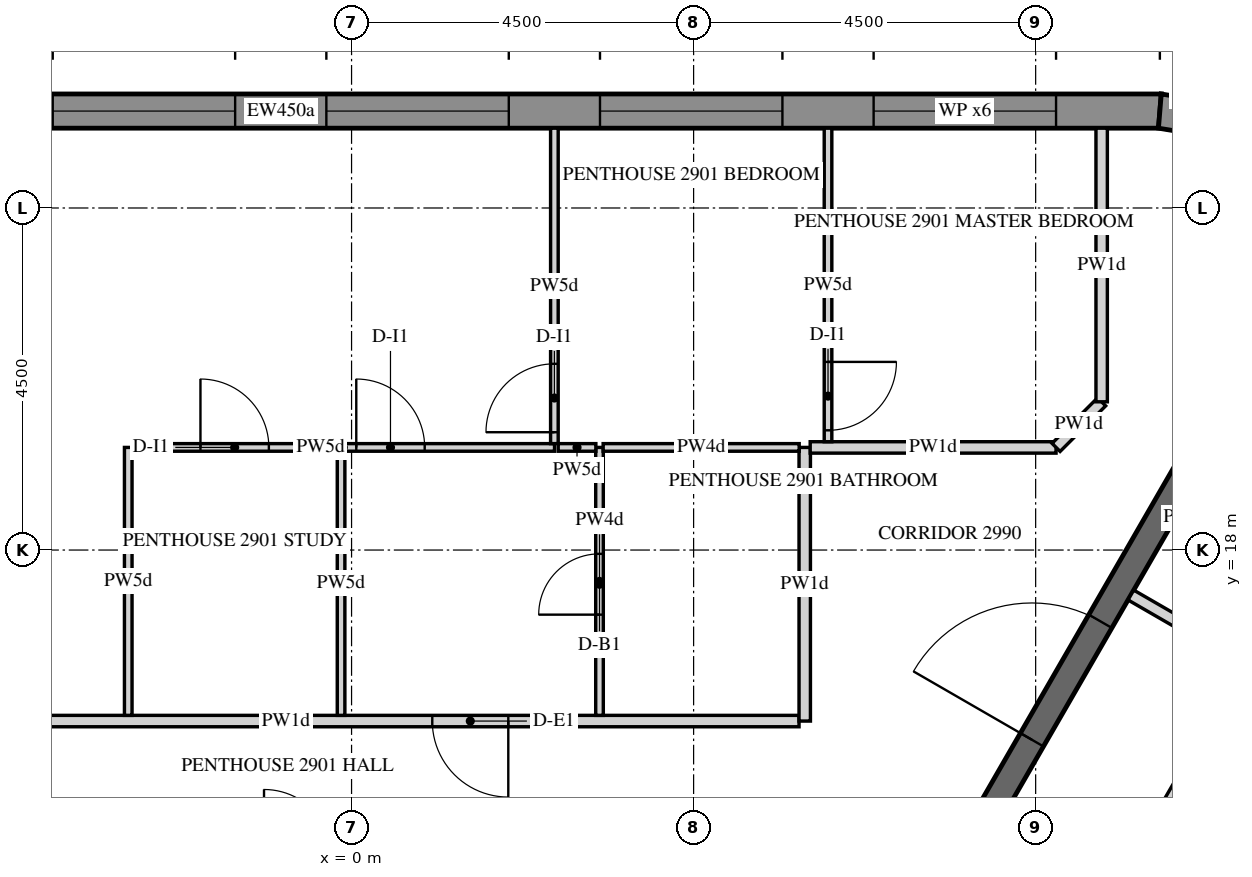
"""IFC4 building model, lengths in metres.
Left out: names, types, materials, properties, quantities, classifications, styles, units other than length and angle.
Written with IfcOpenShell. Run it as: python <this file> out.ifc"""

import sys

from ifc_helpers import new_model, si_unit, direction, frame, frame_2d, origin, place, context, subcontext, project, spatial, polyline, rectangle, outline, extrude, element, fill, save


model = new_model("IFC4")
c1 = context("Model", 3, precision=1e-05, world=origin(), true_north=direction((0.0, 1.0)))
c2 = subcontext(c1, "Body", "Model", "MODEL_VIEW")
j1 = project(units=[si_unit("LENGTHUNIT", "METRE"), si_unit("PLANEANGLEUNIT", "RADIAN")], contexts=[c1])
p1 = place(None, origin())
s1 = spatial("IfcSite", under=j1, at=p1, CompositionType="ELEMENT")
p2 = place(p1, origin())
s2 = spatial("IfcBuilding", under=s1, at=p2, CompositionType="ELEMENT")
p3 = place(p2, frame((0.0, 0.0, 372.9)))
s3 = spatial("IfcBuildingStorey", under=s2, at=p3, CompositionType="ELEMENT", Elevation=372.9)
p4 = place(p3, frame((10.634, 23.775, -0.15), z_axis=(0.0, 0.0, 1.0), x_axis=(-1.0, 0.0, 0.0)))
e1 = element("IfcWall", 1, at=p4, inside=s3, PredefinedType="SOLIDWALL", context=c2, shape_type="SweptSolid", body=[
    extrude(outline(polyline([(-0.018, -0.225), (23.153, -0.225), (23.111, 0.225), (0.018, 0.225), (-0.018, -0.225)])), origin(), (0.0, 0.0, 1.0), 3.55),
])
p5 = place(p4, frame((1.366, 0.0, 0.45)))
e2 = element("IfcOpeningElement", 2, at=p5, cuts=e1, PredefinedType="OPENING", context=c2, shape_type="SweptSolid", body=[
    extrude(rectangle(XDim=2.4, YDim=3.0, at=frame_2d((1.2, 1.5))), frame((0.0, 0.235, 0.0), z_axis=(0.0, -1.0, 0.0), x_axis=(1.0, 0.0, 0.0)), (0.0, 0.0, 1.0), 0.47),
])
p6 = place(p4, frame((4.966, 0.0, 0.45)))
e3 = element("IfcOpeningElement", 3, at=p6, cuts=e1, PredefinedType="OPENING", context=c2, shape_type="SweptSolid", body=[
    extrude(rectangle(XDim=2.4, YDim=3.0, at=frame_2d((1.2, 1.5))), frame((0.0, 0.235, 0.0), z_axis=(0.0, -1.0, 0.0), x_axis=(1.0, 0.0, 0.0)), (0.0, 0.0, 1.0), 0.47),
])
p7 = place(p4, frame((8.566, 0.0, 0.45)))
e4 = element("IfcOpeningElement", 4, at=p7, cuts=e1, PredefinedType="OPENING", context=c2, shape_type="SweptSolid", body=[
    extrude(rectangle(XDim=2.4, YDim=3.0, at=frame_2d((1.2, 1.5))), frame((0.0, 0.235, 0.0), z_axis=(0.0, -1.0, 0.0), x_axis=(1.0, 0.0, 0.0)), (0.0, 0.0, 1.0), 0.47),
])
p8 = place(p4, frame((12.166, 0.0, 0.45)))
e5 = element("IfcOpeningElement", 5, at=p8, cuts=e1, PredefinedType="OPENING", context=c2, shape_type="SweptSolid", body=[
    extrude(rectangle(XDim=2.4, YDim=3.0, at=frame_2d((1.2, 1.5))), frame((0.0, 0.235, 0.0), z_axis=(0.0, -1.0, 0.0), x_axis=(1.0, 0.0, 0.0)), (0.0, 0.0, 1.0), 0.47),
])
p9 = place(p4, frame((15.766, 0.0, 0.45)))
e6 = element("IfcOpeningElement", 6, at=p9, cuts=e1, PredefinedType="OPENING", context=c2, shape_type="SweptSolid", body=[
    extrude(rectangle(XDim=2.4, YDim=3.0, at=frame_2d((1.2, 1.5))), frame((0.0, 0.235, 0.0), z_axis=(0.0, -1.0, 0.0), x_axis=(1.0, 0.0, 0.0)), (0.0, 0.0, 1.0), 0.47),
])
p10 = place(p4, frame((19.366, 0.0, 0.45)))
e7 = element("IfcOpeningElement", 7, at=p10, cuts=e1, PredefinedType="OPENING", context=c2, shape_type="SweptSolid", body=[
    extrude(rectangle(XDim=2.4, YDim=3.0, at=frame_2d((1.2, 1.5))), frame((0.0, 0.235, 0.0), z_axis=(0.0, -1.0, 0.0), x_axis=(1.0, 0.0, 0.0)), (0.0, 0.0, 1.0), 0.47),
])
p11 = place(p3, frame((11.843, 23.576, -0.15), z_axis=(0.0, 0.0, 1.0), x_axis=(-0.986773862881, 0.162102879475, 0.0)))
e8 = element("IfcWall", 8, at=p11, inside=s3, PredefinedType="SOLIDWALL", context=c2, shape_type="SweptSolid", body=[
    extrude(outline(polyline([(-0.037, -0.225), (1.243, -0.225), (1.206, 0.225), (0.037, 0.225), (-0.037, -0.225)])), origin(), (0.0, 0.0, 1.0), 3.55),
])
p12 = place(p3, frame((5.773, 10.0, -0.15), z_axis=(0.0, 0.0, 1.0), x_axis=(0.500007911273, 0.866020836161, 0.0)))
e9 = element("IfcWall", 9, at=p12, inside=s3, PredefinedType="SHEAR", context=c2, shape_type="SweptSolid", body=[
    extrude(rectangle(XDim=14.51, YDim=0.35, at=frame_2d((7.255, 0.0))), origin(), (0.0, 0.0, 1.0), 3.55),
])
p13 = place(p12, frame((6.355, 0.0, 0.15)))
e10 = element("IfcOpeningElement", 10, at=p13, cuts=e9, PredefinedType="OPENING", context=c2, shape_type="SweptSolid", body=[
    extrude(rectangle(XDim=1.8, YDim=2.4, at=frame_2d((0.9, 1.2))), frame((0.0, 0.185, 0.0), z_axis=(0.0, -1.0, 0.0), x_axis=(1.0, 0.0, 0.0)), (0.0, 0.0, 1.0), 0.37),
])
p14 = place(p3, frame((5.887, 15.75, 0.0), z_axis=(0.0, 0.0, 1.0), x_axis=(-1.0, 0.0, 0.0)))
e11 = element("IfcWall", 11, at=p14, inside=s3, PredefinedType="PARTITIONING", context=c2, shape_type="SweptSolid", body=[
    extrude(rectangle(XDim=13.503, YDim=0.15, at=frame_2d((6.752, 0.0))), origin(), (0.0, 0.0, 1.0), 2.47),
])
p15 = place(p14, frame((3.825, 0.0, 0.0)))
e12 = element("IfcOpeningElement", 12, at=p15, cuts=e11, PredefinedType="OPENING", context=c2, shape_type="SweptSolid", body=[
    extrude(rectangle(XDim=1.0, YDim=2.1, at=frame_2d((0.5, 1.05))), frame((0.0, 0.085, 0.0), z_axis=(0.0, -1.0, 0.0), x_axis=(1.0, 0.0, 0.0)), (0.0, 0.0, 1.0), 0.17),
])
p16 = place(p3, frame((5.962, 19.35, 0.0), z_axis=(0.0, 0.0, 1.0), x_axis=(0.0, -1.0, 0.0)))
e13 = element("IfcWall", 13, at=p16, inside=s3, PredefinedType="PARTITIONING", context=c2, shape_type="SweptSolid", body=[
    extrude(rectangle(XDim=3.6, YDim=0.15, at=frame_2d((1.8, 0.0))), origin(), (0.0, 0.0, 1.0), 2.47),
])
p17 = place(p3, frame((9.268, 19.35, 0.0), z_axis=(0.0, 0.0, 1.0), x_axis=(-1.0, 0.0, 0.0)))
e14 = element("IfcWall", 14, at=p17, inside=s3, PredefinedType="PARTITIONING", context=c2, shape_type="SweptSolid", body=[
    extrude(rectangle(XDim=3.234, YDim=0.15, at=frame_2d((1.617, 0.0))), origin(), (0.0, 0.0, 1.0), 2.47),
])
p18 = place(p3, frame((9.868, 19.95, 0.0), z_axis=(0.0, 0.0, 1.0), x_axis=(-0.707250750801, -0.706962782254, 0.0)))
e15 = element("IfcWall", 15, at=p18, inside=s3, PredefinedType="PARTITIONING", context=c2, shape_type="SweptSolid", body=[
    extrude(rectangle(XDim=0.848, YDim=0.15, at=frame_2d((0.424, 0.0))), origin(), (0.0, 0.0, 1.0), 2.47),
])
p19 = place(p3, frame((9.868, 23.55, 0.0), z_axis=(0.0, 0.0, 1.0), x_axis=(0.0, -1.0, 0.0)))
e16 = element("IfcWall", 16, at=p19, inside=s3, PredefinedType="PARTITIONING", context=c2, shape_type="SweptSolid", body=[
    extrude(rectangle(XDim=3.6, YDim=0.15, at=frame_2d((1.8, 0.0))), origin(), (0.0, 0.0, 1.0), 2.47),
])
p20 = place(p3, frame((8.92, 11.499, 0.0), z_axis=(0.0, 0.0, 1.0), x_axis=(0.499984314267, 0.866034459757, 0.0)))
e17 = element("IfcWall", 17, at=p20, inside=s3, PredefinedType="PARTITIONING", context=c2, shape_type="SweptSolid", body=[
    extrude(rectangle(XDim=5.784, YDim=0.15, at=frame_2d((2.892, 0.0))), origin(), (0.0, 0.0, 1.0), 2.47),
])
p21 = place(p3, frame((11.747, 16.546, 0.0), z_axis=(0.0, 0.0, 1.0), x_axis=(-0.866013532718, 0.500020560727, 0.0)))
e18 = element("IfcWall", 18, at=p21, inside=s3, PredefinedType="PARTITIONING", context=c2, shape_type="SweptSolid", body=[
    extrude(rectangle(XDim=1.725, YDim=0.15, at=frame_2d((0.863, 0.0))), origin(), (0.0, 0.0, 1.0), 2.47),
])
p22 = place(p3, frame((-2.888, 19.35, 0.0), z_axis=(0.0, 0.0, 1.0), x_axis=(1.0, 0.0, 0.0)))
e19 = element("IfcWall", 19, at=p22, inside=s3, PredefinedType="PARTITIONING", context=c2, shape_type="SweptSolid", body=[
    extrude(rectangle(XDim=5.558, YDim=0.1, at=frame_2d((2.779, 0.0))), origin(), (0.0, 0.0, 1.0), 2.47),
])
p23 = place(p22, frame((2.95, 0.0, 0.0)))
e20 = element("IfcOpeningElement", 20, at=p23, cuts=e19, PredefinedType="OPENING", context=c2, shape_type="SweptSolid", body=[
    extrude(rectangle(XDim=0.9, YDim=2.1, at=frame_2d((0.45, 1.05))), frame((0.0, 0.06, 0.0), z_axis=(0.0, -1.0, 0.0), x_axis=(1.0, 0.0, 0.0)), (0.0, 0.0, 1.0), 0.12),
])
p24 = place(p22, frame((0.9, 0.0, 0.0)))
e21 = element("IfcOpeningElement", 21, at=p24, cuts=e19, PredefinedType="OPENING", context=c2, shape_type="SweptSolid", body=[
    extrude(rectangle(XDim=0.9, YDim=2.1, at=frame_2d((0.45, 1.05))), frame((0.0, 0.06, 0.0), z_axis=(0.0, -1.0, 0.0), x_axis=(1.0, 0.0, 0.0)), (0.0, 0.0, 1.0), 0.12),
])
p25 = place(p3, frame((2.668, 19.4, 0.0), z_axis=(0.0, 0.0, 1.0), x_axis=(0.0, 1.0, 0.0)))
e22 = element("IfcWall", 22, at=p25, inside=s3, PredefinedType="PARTITIONING", context=c2, shape_type="SweptSolid", body=[
    extrude(rectangle(XDim=4.15, YDim=0.1, at=frame_2d((2.075, 0.0))), origin(), (0.0, 0.0, 1.0), 2.47),
])
p26 = place(p25, frame((0.15, 0.0, 0.0)))
e23 = element("IfcOpeningElement", 23, at=p26, cuts=e22, PredefinedType="OPENING", context=c2, shape_type="SweptSolid", body=[
    extrude(rectangle(XDim=0.9, YDim=2.1, at=frame_2d((0.45, 1.05))), frame((0.0, 0.06, 0.0), z_axis=(0.0, -1.0, 0.0), x_axis=(1.0, 0.0, 0.0)), (0.0, 0.0, 1.0), 0.12),
])
p27 = place(p3, frame((-2.938, 15.825, 0.0), z_axis=(0.0, 0.0, 1.0), x_axis=(0.0, 1.0, 0.0)))
e24 = element("IfcWall", 24, at=p27, inside=s3, PredefinedType="PARTITIONING", context=c2, shape_type="SweptSolid", body=[
    extrude(rectangle(XDim=3.525, YDim=0.1, at=frame_2d((1.763, 0.0))), origin(), (0.0, 0.0, 1.0), 2.47),
])
p28 = place(p3, frame((3.262, 15.825, 0.0), z_axis=(0.0, 0.0, 1.0), x_axis=(0.0, 1.0, 0.0)))
e25 = element("IfcWall", 25, at=p28, inside=s3, PredefinedType="PARTITIONING", context=c2, shape_type="SweptSolid", body=[
    extrude(rectangle(XDim=3.525, YDim=0.1, at=frame_2d((1.763, 0.0))), origin(), (0.0, 0.0, 1.0), 2.47),
])
p29 = place(p28, frame((1.325, 0.0, 0.0)))
e26 = element("IfcOpeningElement", 26, at=p29, cuts=e25, PredefinedType="OPENING", context=c2, shape_type="SweptSolid", body=[
    extrude(rectangle(XDim=0.8, YDim=2.1, at=frame_2d((0.4, 1.05))), frame((0.0, 0.06, 0.0), z_axis=(0.0, -1.0, 0.0), x_axis=(1.0, 0.0, 0.0)), (0.0, 0.0, 1.0), 0.12),
])
p30 = place(p3, frame((3.214, 19.35, 0.0), z_axis=(0.0, 0.0, 1.0), x_axis=(-1.0, 0.0, 0.0)))
e27 = element("IfcWall", 27, at=p30, inside=s3, PredefinedType="PARTITIONING", context=c2, shape_type="SweptSolid", body=[
    extrude(rectangle(XDim=0.496, YDim=0.1, at=frame_2d((0.248, 0.0))), origin(), (0.0, 0.0, 1.0), 2.47),
])
p31 = place(p3, frame((-0.138, 19.3, 0.0), z_axis=(0.0, 0.0, 1.0), x_axis=(0.0, -1.0, 0.0)))
e28 = element("IfcWall", 28, at=p31, inside=s3, PredefinedType="PARTITIONING", context=c2, shape_type="SweptSolid", body=[
    extrude(rectangle(XDim=3.475, YDim=0.1, at=frame_2d((1.738, 0.0))), origin(), (0.0, 0.0, 1.0), 2.47),
])
p32 = place(p3, frame((5.889, 19.35, 0.0), z_axis=(0.0, 0.0, 1.0), x_axis=(-1.0, 0.0, 0.0)))
e29 = element("IfcWall", 29, at=p32, inside=s3, PredefinedType="PARTITIONING", context=c2, shape_type="SweptSolid", body=[
    extrude(rectangle(XDim=2.579, YDim=0.1, at=frame_2d((1.29, 0.0))), origin(), (0.0, 0.0, 1.0), 2.47),
])
p33 = place(p3, frame((6.268, 23.55, 0.0), z_axis=(0.0, 0.0, 1.0), x_axis=(0.0, -1.0, 0.0)))
e30 = element("IfcWall", 30, at=p33, inside=s3, PredefinedType="PARTITIONING", context=c2, shape_type="SweptSolid", body=[
    extrude(rectangle(XDim=4.125, YDim=0.1, at=frame_2d((2.062, 0.0))), origin(), (0.0, 0.0, 1.0), 2.47),
])
p34 = place(p33, frame((3.075, 0.0, 0.0)))
e31 = element("IfcOpeningElement", 31, at=p34, cuts=e30, PredefinedType="OPENING", context=c2, shape_type="SweptSolid", body=[
    extrude(rectangle(XDim=0.9, YDim=2.1, at=frame_2d((0.45, 1.05))), frame((0.0, 0.06, 0.0), z_axis=(0.0, -1.0, 0.0), x_axis=(1.0, 0.0, 0.0)), (0.0, 0.0, 1.0), 0.12),
])
p35 = place(p5, frame((0.0, 0.155, 0.0)))
e32 = element("IfcWindow", 32, at=p35, inside=s3, PartitioningType="DOUBLE_PANEL_VERTICAL", PredefinedType="WINDOW", context=c2, shape_type="SweptSolid", body=[
    extrude(rectangle(XDim=2.4, YDim=3.0, at=frame_2d((1.2, 1.5))), frame((0.0, 0.03, 0.0), z_axis=(0.0, -1.0, 0.0), x_axis=(1.0, 0.0, 0.0)), (0.0, 0.0, 1.0), 0.06),
])
fill(e2, e32)
p36 = place(p6, frame((0.0, 0.155, 0.0)))
e33 = element("IfcWindow", 33, at=p36, inside=s3, PartitioningType="DOUBLE_PANEL_VERTICAL", PredefinedType="WINDOW", context=c2, shape_type="SweptSolid", body=[
    extrude(rectangle(XDim=2.4, YDim=3.0, at=frame_2d((1.2, 1.5))), frame((0.0, 0.03, 0.0), z_axis=(0.0, -1.0, 0.0), x_axis=(1.0, 0.0, 0.0)), (0.0, 0.0, 1.0), 0.06),
])
fill(e3, e33)
p37 = place(p7, frame((0.0, 0.155, 0.0)))
e34 = element("IfcWindow", 34, at=p37, inside=s3, PartitioningType="DOUBLE_PANEL_VERTICAL", PredefinedType="WINDOW", context=c2, shape_type="SweptSolid", body=[
    extrude(rectangle(XDim=2.4, YDim=3.0, at=frame_2d((1.2, 1.5))), frame((0.0, 0.03, 0.0), z_axis=(0.0, -1.0, 0.0), x_axis=(1.0, 0.0, 0.0)), (0.0, 0.0, 1.0), 0.06),
])
fill(e4, e34)
p38 = place(p8, frame((0.0, 0.155, 0.0)))
e35 = element("IfcWindow", 35, at=p38, inside=s3, PartitioningType="DOUBLE_PANEL_VERTICAL", PredefinedType="WINDOW", context=c2, shape_type="SweptSolid", body=[
    extrude(rectangle(XDim=2.4, YDim=3.0, at=frame_2d((1.2, 1.5))), frame((0.0, 0.03, 0.0), z_axis=(0.0, -1.0, 0.0), x_axis=(1.0, 0.0, 0.0)), (0.0, 0.0, 1.0), 0.06),
])
fill(e5, e35)
p39 = place(p13, origin())
e36 = element("IfcDoor", 36, at=p39, inside=s3, OperationType="DOUBLE_DOOR_SINGLE_SWING", PredefinedType="DOOR", context=c2, shape_type="SweptSolid", body=[
    extrude(rectangle(XDim=1.8, YDim=2.4, at=frame_2d((0.9, 1.2))), frame((0.0, 0.025, 0.0), z_axis=(0.0, -1.0, 0.0), x_axis=(1.0, 0.0, 0.0)), (0.0, 0.0, 1.0), 0.05),
])
fill(e10, e36)
p40 = place(p15, origin())
e37 = element("IfcDoor", 37, at=p40, inside=s3, OperationType="SINGLE_SWING_RIGHT", PredefinedType="DOOR", context=c2, shape_type="SweptSolid", body=[
    extrude(rectangle(XDim=1.0, YDim=2.1, at=frame_2d((0.5, 1.05))), frame((0.0, 0.025, 0.0), z_axis=(0.0, -1.0, 0.0), x_axis=(1.0, 0.0, 0.0)), (0.0, 0.0, 1.0), 0.05),
])
fill(e12, e37)
p41 = place(p29, origin())
e38 = element("IfcDoor", 38, at=p41, inside=s3, OperationType="SINGLE_SWING_RIGHT", PredefinedType="DOOR", context=c2, shape_type="SweptSolid", body=[
    extrude(rectangle(XDim=0.8, YDim=2.1, at=frame_2d((0.4, 1.05))), frame((0.0, 0.025, 0.0), z_axis=(0.0, -1.0, 0.0), x_axis=(1.0, 0.0, 0.0)), (0.0, 0.0, 1.0), 0.05),
])
fill(e26, e38)
p42 = place(p23, origin())
e39 = element("IfcDoor", 39, at=p42, inside=s3, OperationType="SINGLE_SWING_RIGHT", PredefinedType="DOOR", context=c2, shape_type="SweptSolid", body=[
    extrude(rectangle(XDim=0.9, YDim=2.1, at=frame_2d((0.45, 1.05))), frame((0.0, 0.025, 0.0), z_axis=(0.0, -1.0, 0.0), x_axis=(1.0, 0.0, 0.0)), (0.0, 0.0, 1.0), 0.05),
])
fill(e20, e39)
p43 = place(p34, origin())
e40 = element("IfcDoor", 40, at=p43, inside=s3, OperationType="SINGLE_SWING_RIGHT", PredefinedType="DOOR", context=c2, shape_type="SweptSolid", body=[
    extrude(rectangle(XDim=0.9, YDim=2.1, at=frame_2d((0.45, 1.05))), frame((0.0, 0.025, 0.0), z_axis=(0.0, -1.0, 0.0), x_axis=(1.0, 0.0, 0.0)), (0.0, 0.0, 1.0), 0.05),
])
fill(e31, e40)
p44 = place(p26, origin())
e41 = element("IfcDoor", 41, at=p44, inside=s3, OperationType="SINGLE_SWING_RIGHT", PredefinedType="DOOR", context=c2, shape_type="SweptSolid", body=[
    extrude(rectangle(XDim=0.9, YDim=2.1, at=frame_2d((0.45, 1.05))), frame((0.0, 0.025, 0.0), z_axis=(0.0, -1.0, 0.0), x_axis=(1.0, 0.0, 0.0)), (0.0, 0.0, 1.0), 0.05),
])
fill(e23, e41)
p45 = place(p24, origin())
e42 = element("IfcDoor", 42, at=p45, inside=s3, OperationType="SINGLE_SWING_RIGHT", PredefinedType="DOOR", context=c2, shape_type="SweptSolid", body=[
    extrude(rectangle(XDim=0.9, YDim=2.1, at=frame_2d((0.45, 1.05))), frame((0.0, 0.025, 0.0), z_axis=(0.0, -1.0, 0.0), x_axis=(1.0, 0.0, 0.0)), (0.0, 0.0, 1.0), 0.05),
])
fill(e21, e42)
save(model, sys.argv[1])
